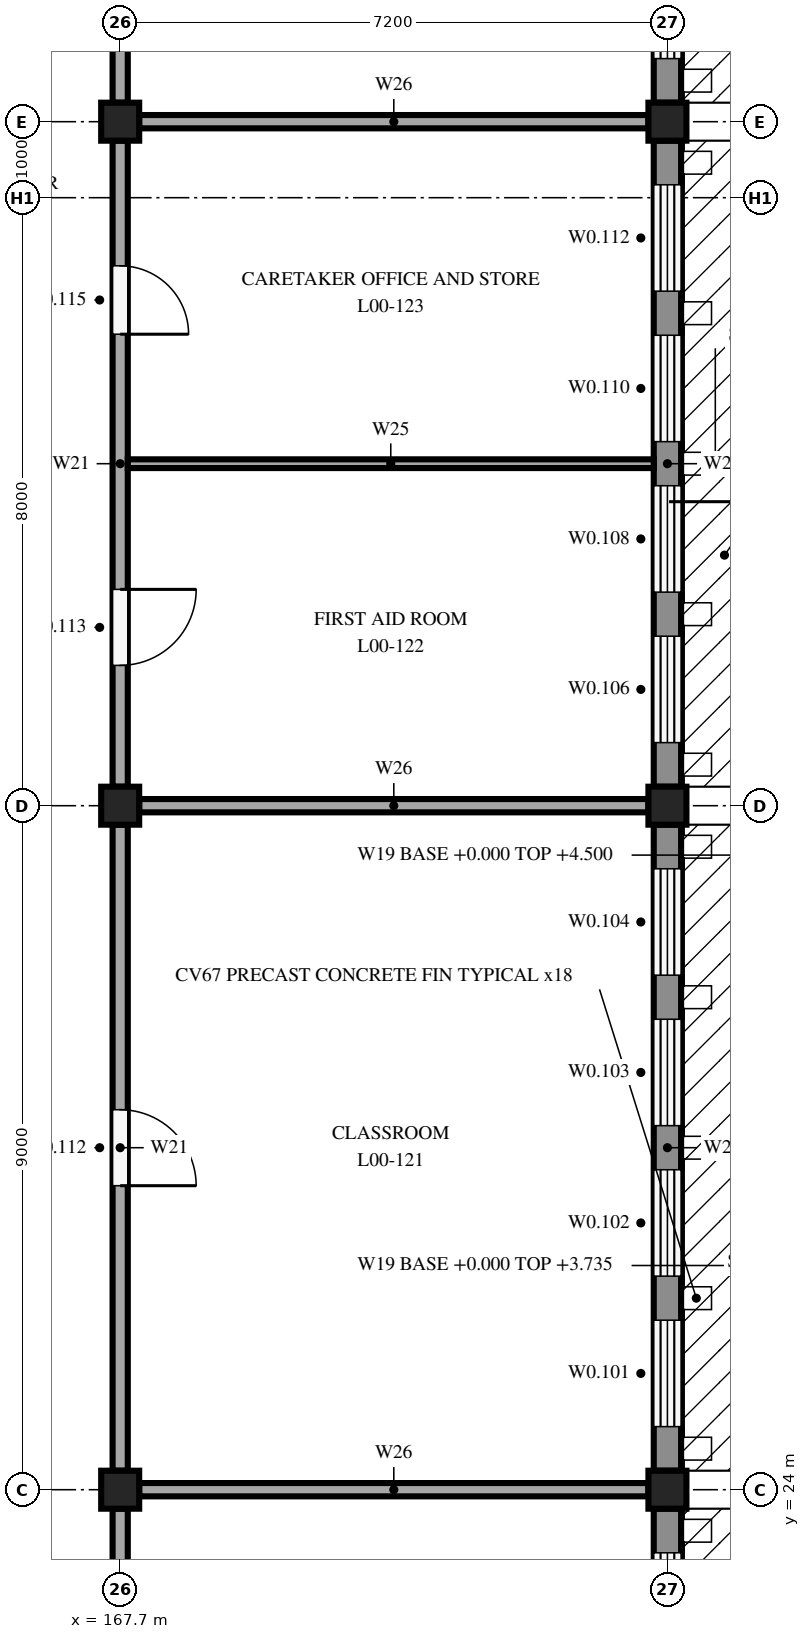
"""IFC4 building model, lengths in metres.
Left out: names, types, materials, properties, quantities, classifications, styles, units other than length and angle.
Written with IfcOpenShell. Run it as: python <this file> out.ifc"""

import sys

from ifc_helpers import new_model, si_unit, direction, frame, frame_2d, origin, origin_2d, place, context, subcontext, project, spatial, rectangle, extrude, element, fill, save


model = new_model("IFC4")
c1 = context("Model", 3, precision=1e-05, world=origin(), true_north=direction((0.0, 1.0)))
c2 = subcontext(c1, "Body", "Model", "MODEL_VIEW")
j1 = project(units=[si_unit("LENGTHUNIT", "METRE"), si_unit("PLANEANGLEUNIT", "RADIAN")], contexts=[c1])
p1 = place(None, origin())
s1 = spatial("IfcSite", under=j1, at=p1, CompositionType="ELEMENT")
p2 = place(p1, origin())
s2 = spatial("IfcBuilding", under=s1, at=p2, CompositionType="ELEMENT")
p3 = place(p2, origin())
s3 = spatial("IfcBuildingStorey", under=s2, at=p3, CompositionType="ELEMENT", Elevation=0.0)
for number, where, z_axis, x_axis in (
    (1, (167.7, 24.0, 0.0), (0.0, 0.0, 1.0), (1.0, 0.0, 0.0)),
    (2, (167.7, 33.0, 0.0), (0.0, 0.0, 1.0), (1.0, 0.0, 0.0)),
    (3, (167.7, 42.0, 0.0), (0.0, 0.0, 1.0), (1.0, 0.0, 0.0)),
    (4, (174.9, 24.0, 0.0), (0.0, 0.0, 1.0), (1.0, 0.0, 0.0)),
    (5, (174.9, 33.0, 0.0), (0.0, 0.0, 1.0), (1.0, 0.0, 0.0)),
    (6, (174.9, 42.0, 0.0), (0.0, 0.0, 1.0), (1.0, 0.0, 0.0)),
):
    element("IfcColumn", number, at=place(p3, frame(where, z_axis=z_axis, x_axis=x_axis)), inside=s3, PredefinedType="COLUMN", context=c2, shape_type="SweptSolid", body=[
        extrude(rectangle(XDim=0.5, YDim=0.5, at=origin_2d()), origin(), (0.0, 0.0, 1.0), 4.25),
    ])
p4 = place(p3, frame((174.9, 23.75, 0.0), z_axis=(0.0, 0.0, 1.0), x_axis=(0.0, -1.0, 0.0)))
e7 = element("IfcWall", 7, at=p4, inside=s3, PredefinedType="STANDARD", context=c2, shape_type="SweptSolid", body=[
    extrude(rectangle(XDim=8.5, YDim=0.36, at=frame_2d((4.25, 0.0))), origin(), (0.0, 0.0, 1.0), 3.75),
])
p5 = place(p4, frame((6.52, 0.0, 0.6)))
e8 = element("IfcOpeningElement", 8, at=p5, cuts=e7, PredefinedType="OPENING", context=c2, shape_type="SweptSolid", body=[
    extrude(rectangle(XDim=1.4, YDim=3.0, at=frame_2d((0.7, 1.5))), frame((0.0, 0.19, 0.0), z_axis=(0.0, -1.0, 0.0), x_axis=(1.0, 0.0, 0.0)), (0.0, 0.0, 1.0), 0.38),
])
p6 = place(p4, frame((4.54, 0.0, 0.6)))
e9 = element("IfcOpeningElement", 9, at=p6, cuts=e7, PredefinedType="OPENING", context=c2, shape_type="SweptSolid", body=[
    extrude(rectangle(XDim=1.4, YDim=3.0, at=frame_2d((0.7, 1.5))), frame((0.0, 0.19, 0.0), z_axis=(0.0, -1.0, 0.0), x_axis=(1.0, 0.0, 0.0)), (0.0, 0.0, 1.0), 0.38),
])
p7 = place(p4, frame((2.56, 0.0, 0.6)))
e10 = element("IfcOpeningElement", 10, at=p7, cuts=e7, PredefinedType="OPENING", context=c2, shape_type="SweptSolid", body=[
    extrude(rectangle(XDim=1.4, YDim=3.0, at=frame_2d((0.7, 1.5))), frame((0.0, 0.19, 0.0), z_axis=(0.0, -1.0, 0.0), x_axis=(1.0, 0.0, 0.0)), (0.0, 0.0, 1.0), 0.38),
])
p8 = place(p4, frame((0.58, 0.0, 0.6)))
e11 = element("IfcOpeningElement", 11, at=p8, cuts=e7, PredefinedType="OPENING", context=c2, shape_type="SweptSolid", body=[
    extrude(rectangle(XDim=1.4, YDim=3.0, at=frame_2d((0.7, 1.5))), frame((0.0, 0.19, 0.0), z_axis=(0.0, -1.0, 0.0), x_axis=(1.0, 0.0, 0.0)), (0.0, 0.0, 1.0), 0.38),
])
p9 = place(p3, frame((174.9, 32.75, 0.0), z_axis=(0.0, 0.0, 1.0), x_axis=(0.0, -1.0, 0.0)))
e12 = element("IfcWall", 12, at=p9, inside=s3, PredefinedType="STANDARD", context=c2, shape_type="SweptSolid", body=[
    extrude(rectangle(XDim=8.5, YDim=0.36, at=frame_2d((4.25, 0.0))), origin(), (0.0, 0.0, 1.0), 3.75),
])
p10 = place(p9, frame((6.52, 0.0, 0.6)))
e13 = element("IfcOpeningElement", 13, at=p10, cuts=e12, PredefinedType="OPENING", context=c2, shape_type="SweptSolid", body=[
    extrude(rectangle(XDim=1.4, YDim=3.0, at=frame_2d((0.7, 1.5))), frame((0.0, 0.19, 0.0), z_axis=(0.0, -1.0, 0.0), x_axis=(1.0, 0.0, 0.0)), (0.0, 0.0, 1.0), 0.38),
])
p11 = place(p9, frame((4.54, 0.0, 0.6)))
e14 = element("IfcOpeningElement", 14, at=p11, cuts=e12, PredefinedType="OPENING", context=c2, shape_type="SweptSolid", body=[
    extrude(rectangle(XDim=1.4, YDim=3.0, at=frame_2d((0.7, 1.5))), frame((0.0, 0.19, 0.0), z_axis=(0.0, -1.0, 0.0), x_axis=(1.0, 0.0, 0.0)), (0.0, 0.0, 1.0), 0.38),
])
p12 = place(p9, frame((2.56, 0.0, 0.6)))
e15 = element("IfcOpeningElement", 15, at=p12, cuts=e12, PredefinedType="OPENING", context=c2, shape_type="SweptSolid", body=[
    extrude(rectangle(XDim=1.4, YDim=3.0, at=frame_2d((0.7, 1.5))), frame((0.0, 0.19, 0.0), z_axis=(0.0, -1.0, 0.0), x_axis=(1.0, 0.0, 0.0)), (0.0, 0.0, 1.0), 0.38),
])
p13 = place(p9, frame((0.58, 0.0, 0.6)))
e16 = element("IfcOpeningElement", 16, at=p13, cuts=e12, PredefinedType="OPENING", context=c2, shape_type="SweptSolid", body=[
    extrude(rectangle(XDim=1.4, YDim=3.0, at=frame_2d((0.7, 1.5))), frame((0.0, 0.19, 0.0), z_axis=(0.0, -1.0, 0.0), x_axis=(1.0, 0.0, 0.0)), (0.0, 0.0, 1.0), 0.38),
])
p14 = place(p3, frame((174.9, 41.75, 0.0), z_axis=(0.0, 0.0, 1.0), x_axis=(0.0, -1.0, 0.0)))
e17 = element("IfcWall", 17, at=p14, inside=s3, PredefinedType="STANDARD", context=c2, shape_type="SweptSolid", body=[
    extrude(rectangle(XDim=8.5, YDim=0.36, at=frame_2d((4.25, 0.0))), origin(), (0.0, 0.0, 1.0), 3.75),
])
p15 = place(p14, frame((6.52, 0.0, 0.6)))
e18 = element("IfcOpeningElement", 18, at=p15, cuts=e17, PredefinedType="OPENING", context=c2, shape_type="SweptSolid", body=[
    extrude(rectangle(XDim=1.4, YDim=3.0, at=frame_2d((0.7, 1.5))), frame((0.0, 0.19, 0.0), z_axis=(0.0, -1.0, 0.0), x_axis=(1.0, 0.0, 0.0)), (0.0, 0.0, 1.0), 0.38),
])
p16 = place(p14, frame((4.54, 0.0, 0.6)))
e19 = element("IfcOpeningElement", 19, at=p16, cuts=e17, PredefinedType="OPENING", context=c2, shape_type="SweptSolid", body=[
    extrude(rectangle(XDim=1.4, YDim=3.0, at=frame_2d((0.7, 1.5))), frame((0.0, 0.19, 0.0), z_axis=(0.0, -1.0, 0.0), x_axis=(1.0, 0.0, 0.0)), (0.0, 0.0, 1.0), 0.38),
])
p17 = place(p14, frame((2.56, 0.0, 0.9)))
e20 = element("IfcOpeningElement", 20, at=p17, cuts=e17, PredefinedType="OPENING", context=c2, shape_type="SweptSolid", body=[
    extrude(rectangle(XDim=1.4, YDim=2.7, at=frame_2d((0.7, 1.35))), frame((0.0, 0.19, 0.0), z_axis=(0.0, -1.0, 0.0), x_axis=(1.0, 0.0, 0.0)), (0.0, 0.0, 1.0), 0.38),
])
p18 = place(p14, frame((0.58, 0.0, 0.9)))
e21 = element("IfcOpeningElement", 21, at=p18, cuts=e17, PredefinedType="OPENING", context=c2, shape_type="SweptSolid", body=[
    extrude(rectangle(XDim=1.4, YDim=2.7, at=frame_2d((0.7, 1.35))), frame((0.0, 0.19, 0.0), z_axis=(0.0, -1.0, 0.0), x_axis=(1.0, 0.0, 0.0)), (0.0, 0.0, 1.0), 0.38),
])
p19 = place(p3, frame((174.9, 50.75, 0.0), z_axis=(0.0, 0.0, 1.0), x_axis=(0.0, -1.0, 0.0)))
e22 = element("IfcWall", 22, at=p19, inside=s3, PredefinedType="STANDARD", context=c2, shape_type="SweptSolid", body=[
    extrude(rectangle(XDim=8.5, YDim=0.36, at=frame_2d((4.25, 0.0))), origin(), (0.0, 0.0, 1.0), 3.75),
])
p20 = place(p19, frame((6.52, 0.0, 0.6)))
e23 = element("IfcOpeningElement", 23, at=p20, cuts=e22, PredefinedType="OPENING", context=c2, shape_type="SweptSolid", body=[
    extrude(rectangle(XDim=1.4, YDim=3.0, at=frame_2d((0.7, 1.5))), frame((0.0, 0.19, 0.0), z_axis=(0.0, -1.0, 0.0), x_axis=(1.0, 0.0, 0.0)), (0.0, 0.0, 1.0), 0.38),
])
p21 = place(p19, frame((4.54, 0.0, 0.6)))
e24 = element("IfcOpeningElement", 24, at=p21, cuts=e22, PredefinedType="OPENING", context=c2, shape_type="SweptSolid", body=[
    extrude(rectangle(XDim=1.4, YDim=3.0, at=frame_2d((0.7, 1.5))), frame((0.0, 0.19, 0.0), z_axis=(0.0, -1.0, 0.0), x_axis=(1.0, 0.0, 0.0)), (0.0, 0.0, 1.0), 0.38),
])
p22 = place(p19, frame((2.56, 0.0, 0.6)))
e25 = element("IfcOpeningElement", 25, at=p22, cuts=e22, PredefinedType="OPENING", context=c2, shape_type="SweptSolid", body=[
    extrude(rectangle(XDim=1.4, YDim=3.0, at=frame_2d((0.7, 1.5))), frame((0.0, 0.19, 0.0), z_axis=(0.0, -1.0, 0.0), x_axis=(1.0, 0.0, 0.0)), (0.0, 0.0, 1.0), 0.38),
])
p23 = place(p19, frame((0.58, 0.0, 0.6)))
e26 = element("IfcOpeningElement", 26, at=p23, cuts=e22, PredefinedType="OPENING", context=c2, shape_type="SweptSolid", body=[
    extrude(rectangle(XDim=1.4, YDim=3.0, at=frame_2d((0.7, 1.5))), frame((0.0, 0.19, 0.0), z_axis=(0.0, -1.0, 0.0), x_axis=(1.0, 0.0, 0.0)), (0.0, 0.0, 1.0), 0.38),
])
p24 = place(p3, frame((167.7, 23.75, 0.0), z_axis=(0.0, 0.0, 1.0), x_axis=(0.0, -1.0, 0.0)))
e27 = element("IfcWall", 27, at=p24, inside=s3, PredefinedType="PARTITIONING", context=c2, shape_type="SweptSolid", body=[
    extrude(rectangle(XDim=8.5, YDim=0.2, at=frame_2d((4.25, 0.0))), origin(), (0.0, 0.0, 1.0), 3.8),
])
p25 = place(p24, frame((3.75, 0.0, 0.0)))
e28 = element("IfcOpeningElement", 28, at=p25, cuts=e27, PredefinedType="OPENING", context=c2, shape_type="SweptSolid", body=[
    extrude(rectangle(XDim=1.0, YDim=2.1, at=frame_2d((0.5, 1.05))), frame((0.0, 0.11, 0.0), z_axis=(0.0, -1.0, 0.0), x_axis=(1.0, 0.0, 0.0)), (0.0, 0.0, 1.0), 0.22),
])
p26 = place(p3, frame((167.7, 32.75, 0.0), z_axis=(0.0, 0.0, 1.0), x_axis=(0.0, -1.0, 0.0)))
e29 = element("IfcWall", 29, at=p26, inside=s3, PredefinedType="PARTITIONING", context=c2, shape_type="SweptSolid", body=[
    extrude(rectangle(XDim=8.5, YDim=0.2, at=frame_2d((4.25, 0.0))), origin(), (0.0, 0.0, 1.0), 3.8),
])
p27 = place(p26, frame((3.75, 0.0, 0.0)))
e30 = element("IfcOpeningElement", 30, at=p27, cuts=e29, PredefinedType="OPENING", context=c2, shape_type="SweptSolid", body=[
    extrude(rectangle(XDim=1.0, YDim=2.1, at=frame_2d((0.5, 1.05))), frame((0.0, 0.11, 0.0), z_axis=(0.0, -1.0, 0.0), x_axis=(1.0, 0.0, 0.0)), (0.0, 0.0, 1.0), 0.22),
])
p28 = place(p3, frame((167.7, 41.75, 0.0), z_axis=(0.0, 0.0, 1.0), x_axis=(0.0, -1.0, 0.0)))
e31 = element("IfcWall", 31, at=p28, inside=s3, PredefinedType="PARTITIONING", context=c2, shape_type="SweptSolid", body=[
    extrude(rectangle(XDim=8.5, YDim=0.2, at=frame_2d((4.25, 0.0))), origin(), (0.0, 0.0, 1.0), 3.8),
])
p29 = place(p28, frame((5.904, 0.0, 0.0)))
e32 = element("IfcOpeningElement", 32, at=p29, cuts=e31, PredefinedType="OPENING", context=c2, shape_type="SweptSolid", body=[
    extrude(rectangle(XDim=1.0, YDim=2.1, at=frame_2d((0.5, 1.05))), frame((0.0, 0.11, 0.0), z_axis=(0.0, -1.0, 0.0), x_axis=(1.0, 0.0, 0.0)), (0.0, 0.0, 1.0), 0.22),
])
p30 = place(p28, frame((1.646, 0.0, 0.0)))
e33 = element("IfcOpeningElement", 33, at=p30, cuts=e31, PredefinedType="OPENING", context=c2, shape_type="SweptSolid", body=[
    extrude(rectangle(XDim=0.9, YDim=2.1, at=frame_2d((0.45, 1.05))), frame((0.0, 0.11, 0.0), z_axis=(0.0, -1.0, 0.0), x_axis=(1.0, 0.0, 0.0)), (0.0, 0.0, 1.0), 0.22),
])
p31 = place(p3, frame((167.7, 50.75, 0.0), z_axis=(0.0, 0.0, 1.0), x_axis=(0.0, -1.0, 0.0)))
e34 = element("IfcWall", 34, at=p31, inside=s3, PredefinedType="PARTITIONING", context=c2, shape_type="SweptSolid", body=[
    extrude(rectangle(XDim=8.5, YDim=0.2, at=frame_2d((4.25, 0.0))), origin(), (0.0, 0.0, 1.0), 3.8),
])
p32 = place(p31, frame((3.75, 0.0, 0.0)))
e35 = element("IfcOpeningElement", 35, at=p32, cuts=e34, PredefinedType="OPENING", context=c2, shape_type="SweptSolid", body=[
    extrude(rectangle(XDim=1.0, YDim=2.1, at=frame_2d((0.5, 1.05))), frame((0.0, 0.11, 0.0), z_axis=(0.0, -1.0, 0.0), x_axis=(1.0, 0.0, 0.0)), (0.0, 0.0, 1.0), 0.22),
])
for number, where, z_axis, x_axis in (
    (36, (167.95, 24.0, 0.0), (0.0, 0.0, 1.0), (1.0, 0.0, 0.0)),
    (37, (167.95, 33.0, 0.0), (0.0, 0.0, 1.0), (1.0, 0.0, 0.0)),
):
    element("IfcWall", number, at=place(p3, frame(where, z_axis=z_axis, x_axis=x_axis)), inside=s3, PredefinedType="PARTITIONING", context=c2, shape_type="SweptSolid", body=[
        extrude(rectangle(XDim=6.7, YDim=0.175, at=frame_2d((3.35, 0.0))), origin(), (0.0, 0.0, 1.0), 3.8),
    ])
p33 = place(p3, frame((167.8, 37.5, 0.0), z_axis=(0.0, 0.0, 1.0), x_axis=(1.0, 0.0, 0.0)))
e38 = element("IfcWall", 38, at=p33, inside=s3, PredefinedType="PARTITIONING", context=c2, shape_type="SweptSolid", body=[
    extrude(rectangle(XDim=6.92, YDim=0.115, at=frame_2d((3.46, 0.0))), origin(), (0.0, 0.0, 1.0), 4.25),
])
p34 = place(p3, frame((167.95, 42.0, 0.0), z_axis=(0.0, 0.0, 1.0), x_axis=(1.0, 0.0, 0.0)))
e39 = element("IfcWall", 39, at=p34, inside=s3, PredefinedType="PARTITIONING", context=c2, shape_type="SweptSolid", body=[
    extrude(rectangle(XDim=6.7, YDim=0.175, at=frame_2d((3.35, 0.0))), origin(), (0.0, 0.0, 1.0), 3.8),
])
p35 = place(p8, origin())
e40 = element("IfcWindow", 40, at=p35, inside=s3, PartitioningType="DOUBLE_PANEL_VERTICAL", PredefinedType="WINDOW", context=c2, shape_type="SweptSolid", body=[
    extrude(rectangle(XDim=1.4, YDim=3.0, at=frame_2d((0.7, 1.5))), frame((0.0, 0.03, 0.0), z_axis=(0.0, -1.0, 0.0), x_axis=(1.0, 0.0, 0.0)), (0.0, 0.0, 1.0), 0.06),
])
fill(e11, e40)
p36 = place(p10, origin())
e41 = element("IfcWindow", 41, at=p36, inside=s3, PartitioningType="DOUBLE_PANEL_VERTICAL", PredefinedType="WINDOW", context=c2, shape_type="SweptSolid", body=[
    extrude(rectangle(XDim=1.4, YDim=3.0, at=frame_2d((0.7, 1.5))), frame((0.0, 0.03, 0.0), z_axis=(0.0, -1.0, 0.0), x_axis=(1.0, 0.0, 0.0)), (0.0, 0.0, 1.0), 0.06),
])
fill(e13, e41)
p37 = place(p11, origin())
e42 = element("IfcWindow", 42, at=p37, inside=s3, PartitioningType="DOUBLE_PANEL_VERTICAL", PredefinedType="WINDOW", context=c2, shape_type="SweptSolid", body=[
    extrude(rectangle(XDim=1.4, YDim=3.0, at=frame_2d((0.7, 1.5))), frame((0.0, 0.03, 0.0), z_axis=(0.0, -1.0, 0.0), x_axis=(1.0, 0.0, 0.0)), (0.0, 0.0, 1.0), 0.06),
])
fill(e14, e42)
p38 = place(p12, origin())
e43 = element("IfcWindow", 43, at=p38, inside=s3, PartitioningType="DOUBLE_PANEL_VERTICAL", PredefinedType="WINDOW", context=c2, shape_type="SweptSolid", body=[
    extrude(rectangle(XDim=1.4, YDim=3.0, at=frame_2d((0.7, 1.5))), frame((0.0, 0.03, 0.0), z_axis=(0.0, -1.0, 0.0), x_axis=(1.0, 0.0, 0.0)), (0.0, 0.0, 1.0), 0.06),
])
fill(e15, e43)
p39 = place(p13, origin())
e44 = element("IfcWindow", 44, at=p39, inside=s3, PartitioningType="DOUBLE_PANEL_VERTICAL", PredefinedType="WINDOW", context=c2, shape_type="SweptSolid", body=[
    extrude(rectangle(XDim=1.4, YDim=3.0, at=frame_2d((0.7, 1.5))), frame((0.0, 0.03, 0.0), z_axis=(0.0, -1.0, 0.0), x_axis=(1.0, 0.0, 0.0)), (0.0, 0.0, 1.0), 0.06),
])
fill(e16, e44)
p40 = place(p15, origin())
e45 = element("IfcWindow", 45, at=p40, inside=s3, PartitioningType="DOUBLE_PANEL_VERTICAL", PredefinedType="WINDOW", context=c2, shape_type="SweptSolid", body=[
    extrude(rectangle(XDim=1.4, YDim=3.0, at=frame_2d((0.7, 1.5))), frame((0.0, 0.03, 0.0), z_axis=(0.0, -1.0, 0.0), x_axis=(1.0, 0.0, 0.0)), (0.0, 0.0, 1.0), 0.06),
])
fill(e18, e45)
p41 = place(p16, origin())
e46 = element("IfcWindow", 46, at=p41, inside=s3, PartitioningType="DOUBLE_PANEL_VERTICAL", PredefinedType="WINDOW", context=c2, shape_type="SweptSolid", body=[
    extrude(rectangle(XDim=1.4, YDim=3.0, at=frame_2d((0.7, 1.5))), frame((0.0, 0.03, 0.0), z_axis=(0.0, -1.0, 0.0), x_axis=(1.0, 0.0, 0.0)), (0.0, 0.0, 1.0), 0.06),
])
fill(e19, e46)
p42 = place(p17, origin())
e47 = element("IfcWindow", 47, at=p42, inside=s3, PartitioningType="DOUBLE_PANEL_VERTICAL", PredefinedType="WINDOW", context=c2, shape_type="SweptSolid", body=[
    extrude(rectangle(XDim=1.4, YDim=2.7, at=frame_2d((0.7, 1.35))), frame((0.0, 0.03, 0.0), z_axis=(0.0, -1.0, 0.0), x_axis=(1.0, 0.0, 0.0)), (0.0, 0.0, 1.0), 0.06),
])
fill(e20, e47)
p43 = place(p18, origin())
e48 = element("IfcWindow", 48, at=p43, inside=s3, PartitioningType="DOUBLE_PANEL_VERTICAL", PredefinedType="WINDOW", context=c2, shape_type="SweptSolid", body=[
    extrude(rectangle(XDim=1.4, YDim=2.7, at=frame_2d((0.7, 1.35))), frame((0.0, 0.03, 0.0), z_axis=(0.0, -1.0, 0.0), x_axis=(1.0, 0.0, 0.0)), (0.0, 0.0, 1.0), 0.06),
])
fill(e21, e48)
p44 = place(p20, origin())
e49 = element("IfcWindow", 49, at=p44, inside=s3, PartitioningType="DOUBLE_PANEL_VERTICAL", PredefinedType="WINDOW", context=c2, shape_type="SweptSolid", body=[
    extrude(rectangle(XDim=1.4, YDim=3.0, at=frame_2d((0.7, 1.5))), frame((0.0, 0.03, 0.0), z_axis=(0.0, -1.0, 0.0), x_axis=(1.0, 0.0, 0.0)), (0.0, 0.0, 1.0), 0.06),
])
fill(e23, e49)
p45 = place(p27, origin())
e50 = element("IfcDoor", 50, at=p45, inside=s3, OperationType="SINGLE_SWING_RIGHT", PredefinedType="DOOR", context=c2, shape_type="SweptSolid", body=[
    extrude(rectangle(XDim=1.0, YDim=2.1, at=frame_2d((0.5, 1.05))), frame((0.0, 0.025, 0.0), z_axis=(0.0, -1.0, 0.0), x_axis=(1.0, 0.0, 0.0)), (0.0, 0.0, 1.0), 0.05),
])
fill(e30, e50)
p46 = place(p29, origin())
e51 = element("IfcDoor", 51, at=p46, inside=s3, OperationType="SINGLE_SWING_LEFT", PredefinedType="DOOR", context=c2, shape_type="SweptSolid", body=[
    extrude(rectangle(XDim=1.0, YDim=2.1, at=frame_2d((0.5, 1.05))), frame((0.0, 0.025, 0.0), z_axis=(0.0, -1.0, 0.0), x_axis=(1.0, 0.0, 0.0)), (0.0, 0.0, 1.0), 0.05),
])
fill(e32, e51)
p47 = place(p30, origin())
e52 = element("IfcDoor", 52, at=p47, inside=s3, OperationType="SINGLE_SWING_RIGHT", PredefinedType="DOOR", context=c2, shape_type="SweptSolid", body=[
    extrude(rectangle(XDim=0.9, YDim=2.1, at=frame_2d((0.45, 1.05))), frame((0.0, 0.025, 0.0), z_axis=(0.0, -1.0, 0.0), x_axis=(1.0, 0.0, 0.0)), (0.0, 0.0, 1.0), 0.05),
])
fill(e33, e52)
save(model, sys.argv[1])
